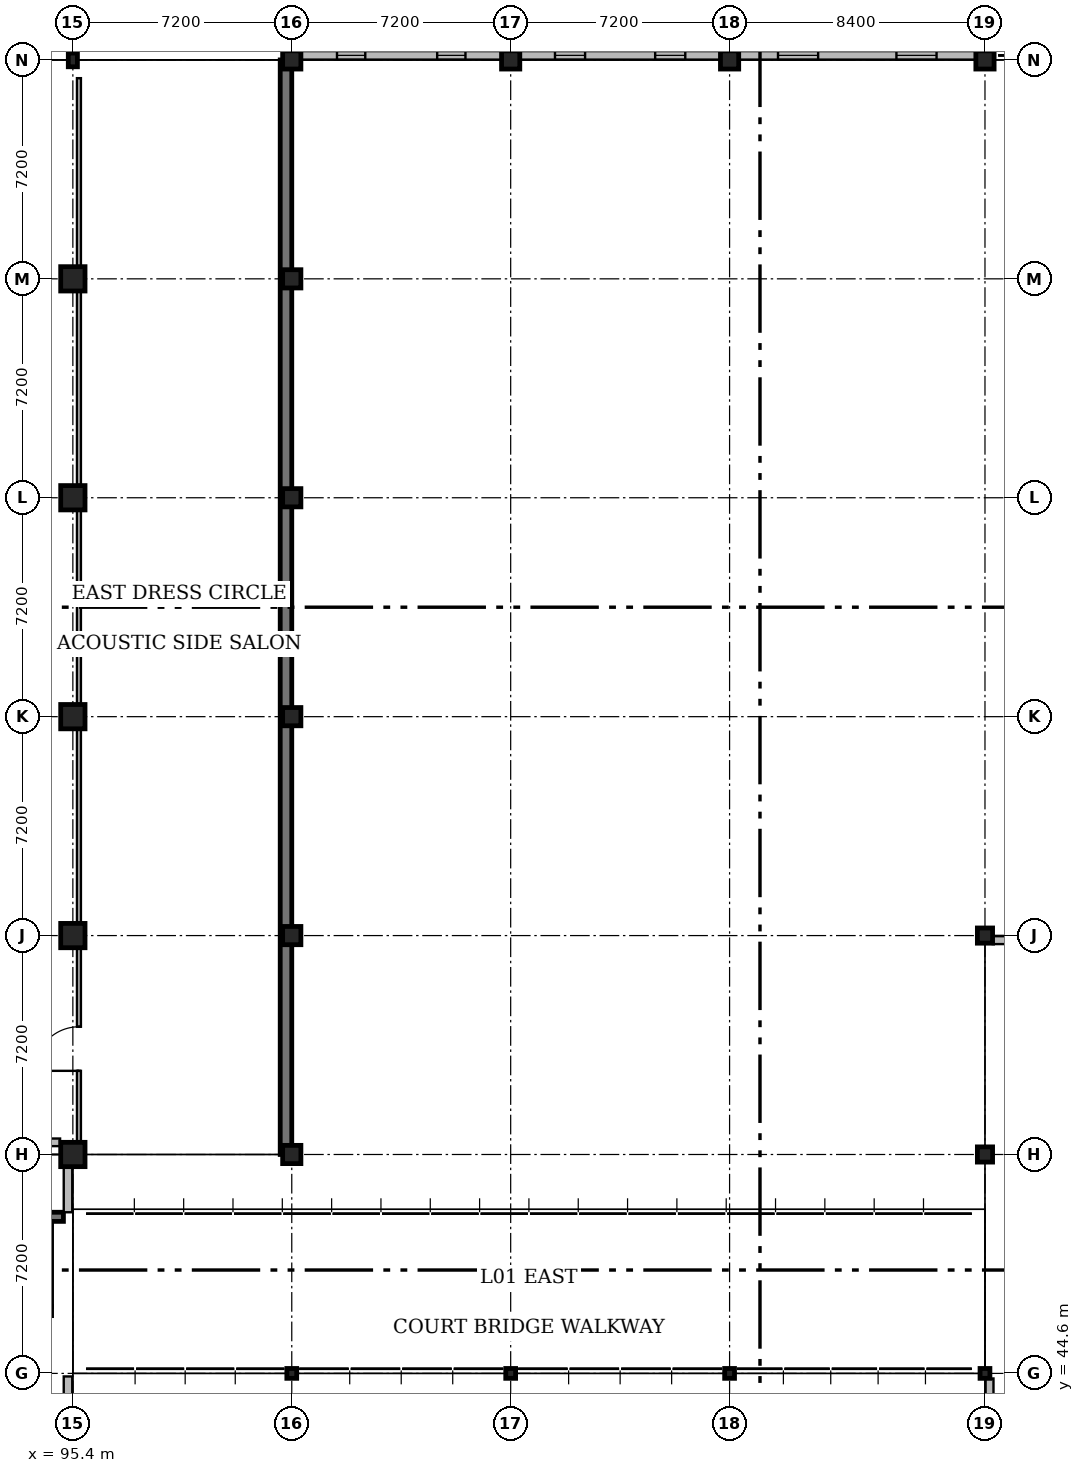
"""IFC4 building model, lengths in metres.
Left out: names, types, materials, properties, quantities, classifications, styles, units other than length and angle.
Written with IfcOpenShell. Run it as: python <this file> out.ifc"""

import sys

from ifc_helpers import new_model, si_unit, direction, frame, frame_2d, origin, origin_2d, place, context, subcontext, project, spatial, rectangle, hollow_circle, i_section, extrude, element, fill, save


model = new_model("IFC4")
c1 = context("Model", 3, precision=1e-05, world=origin(), true_north=direction((0.0, 1.0)))
c2 = subcontext(c1, "Body", "Model", "MODEL_VIEW")
j1 = project(units=[si_unit("LENGTHUNIT", "METRE"), si_unit("PLANEANGLEUNIT", "RADIAN")], contexts=[c1])
p1 = place(None, origin())
s1 = spatial("IfcSite", under=j1, at=p1, CompositionType="ELEMENT")
p2 = place(p1, origin())
s2 = spatial("IfcBuilding", under=s1, at=p2, CompositionType="ELEMENT")
p3 = place(p2, frame((0.0, 0.0, 4.8)))
s3 = spatial("IfcBuildingStorey", under=s2, at=p3, CompositionType="ELEMENT", Elevation=4.8)
for number, where, z_axis, x_axis in (
    (1, (95.4, 51.8, 0.0), (0.0, 0.0, 1.0), (1.0, 0.0, 0.0)),
    (2, (95.4, 59.0, 0.0), (0.0, 0.0, 1.0), (1.0, 0.0, 0.0)),
    (3, (95.4, 66.2, 0.0), (0.0, 0.0, 1.0), (1.0, 0.0, 0.0)),
    (4, (95.4, 73.4, 0.0), (0.0, 0.0, 1.0), (1.0, 0.0, 0.0)),
    (5, (95.4, 80.6, 0.0), (0.0, 0.0, 1.0), (1.0, 0.0, 0.0)),
):
    element("IfcColumn", number, at=place(p3, frame(where, z_axis=z_axis, x_axis=x_axis)), inside=s3, PredefinedType="COLUMN", context=c2, shape_type="SweptSolid", body=[
        extrude(rectangle(XDim=0.8, YDim=0.8, at=origin_2d()), origin(), (0.0, 0.0, 1.0), 4.2),
    ])
p4 = place(p3, frame((95.4, 87.8, 0.0), z_axis=(0.0, 0.0, 1.0), x_axis=(1.0, 0.0, 0.0)))
e6 = element("IfcColumn", 6, at=p4, inside=s3, PredefinedType="COLUMN", context=c2, shape_type="SweptSolid", body=[
    extrude(i_section(OverallWidth=0.3, OverallDepth=0.45, WebThickness=0.014, FlangeThickness=0.026, FilletRadius=0.027, at=origin_2d()), origin(), (0.0, 0.0, 1.0), 4.2),
])
p5 = place(p3, frame((102.6, 44.6, 0.0), z_axis=(0.0, 0.0, 1.0), x_axis=(1.0, 0.0, 0.0)))
e7 = element("IfcColumn", 7, at=p5, inside=s3, PredefinedType="COLUMN", context=c2, shape_type="SweptSolid", body=[
    extrude(hollow_circle(Radius=0.162, WallThickness=0.012, at=origin_2d()), origin(), (0.0, 0.0, 1.0), 4.2),
])
for number, where, z_axis, x_axis in (
    (8, (102.6, 51.8, 0.0), (0.0, 0.0, 1.0), (1.0, 0.0, 0.0)),
    (9, (102.6, 59.0, 0.0), (0.0, 0.0, 1.0), (1.0, 0.0, 0.0)),
    (10, (102.6, 66.2, 0.0), (0.0, 0.0, 1.0), (1.0, 0.0, 0.0)),
    (11, (102.6, 73.4, 0.0), (0.0, 0.0, 1.0), (1.0, 0.0, 0.0)),
    (12, (102.6, 80.6, 0.0), (0.0, 0.0, 1.0), (1.0, 0.0, 0.0)),
    (13, (102.6, 87.8, 0.0), (0.0, 0.0, 1.0), (1.0, 0.0, 0.0)),
):
    element("IfcColumn", number, at=place(p3, frame(where, z_axis=z_axis, x_axis=x_axis)), inside=s3, PredefinedType="COLUMN", context=c2, shape_type="SweptSolid", body=[
        extrude(rectangle(XDim=0.6, YDim=0.6, at=origin_2d()), origin(), (0.0, 0.0, 1.0), 4.2),
    ])
p6 = place(p3, frame((109.8, 44.6, 0.0), z_axis=(0.0, 0.0, 1.0), x_axis=(1.0, 0.0, 0.0)))
e14 = element("IfcColumn", 14, at=p6, inside=s3, PredefinedType="COLUMN", context=c2, shape_type="SweptSolid", body=[
    extrude(hollow_circle(Radius=0.162, WallThickness=0.012, at=origin_2d()), origin(), (0.0, 0.0, 1.0), 4.2),
])
p7 = place(p3, frame((109.8, 87.8, 0.0), z_axis=(0.0, 0.0, 1.0), x_axis=(1.0, 0.0, 0.0)))
e15 = element("IfcColumn", 15, at=p7, inside=s3, PredefinedType="COLUMN", context=c2, shape_type="SweptSolid", body=[
    extrude(rectangle(XDim=0.6, YDim=0.6, at=origin_2d()), origin(), (0.0, 0.0, 1.0), 4.2),
])
p8 = place(p3, frame((117.0, 44.6, 0.0), z_axis=(0.0, 0.0, 1.0), x_axis=(1.0, 0.0, 0.0)))
e16 = element("IfcColumn", 16, at=p8, inside=s3, PredefinedType="COLUMN", context=c2, shape_type="SweptSolid", body=[
    extrude(hollow_circle(Radius=0.162, WallThickness=0.012, at=origin_2d()), origin(), (0.0, 0.0, 1.0), 4.2),
])
p9 = place(p3, frame((117.0, 87.8, 0.0), z_axis=(0.0, 0.0, 1.0), x_axis=(1.0, 0.0, 0.0)))
e17 = element("IfcColumn", 17, at=p9, inside=s3, PredefinedType="COLUMN", context=c2, shape_type="SweptSolid", body=[
    extrude(rectangle(XDim=0.6, YDim=0.6, at=origin_2d()), origin(), (0.0, 0.0, 1.0), 4.2),
])
p10 = place(p3, frame((125.4, 44.6, 0.0), z_axis=(0.0, 0.0, 1.0), x_axis=(1.0, 0.0, 0.0)))
e18 = element("IfcColumn", 18, at=p10, inside=s3, PredefinedType="COLUMN", context=c2, shape_type="SweptSolid", body=[
    extrude(hollow_circle(Radius=0.162, WallThickness=0.012, at=origin_2d()), origin(), (0.0, 0.0, 1.0), 4.2),
])
for number, where, z_axis, x_axis in (
    (19, (125.4, 51.8, 0.0), (0.0, 0.0, 1.0), (1.0, 0.0, 0.0)),
    (20, (125.4, 59.0, 0.0), (0.0, 0.0, 1.0), (1.0, 0.0, 0.0)),
):
    element("IfcColumn", number, at=place(p3, frame(where, z_axis=z_axis, x_axis=x_axis)), inside=s3, PredefinedType="COLUMN", context=c2, shape_type="SweptSolid", body=[
        extrude(rectangle(XDim=0.5, YDim=0.5, at=origin_2d()), origin(), (0.0, 0.0, 1.0), 4.2),
    ])
p11 = place(p3, frame((125.4, 87.8, 0.0), z_axis=(0.0, 0.0, 1.0), x_axis=(1.0, 0.0, 0.0)))
e21 = element("IfcColumn", 21, at=p11, inside=s3, PredefinedType="COLUMN", context=c2, shape_type="SweptSolid", body=[
    extrude(rectangle(XDim=0.6, YDim=0.6, at=origin_2d()), origin(), (0.0, 0.0, 1.0), 4.2),
])
p12 = place(p3, frame((91.9, 49.75, 0.0), z_axis=(0.0, 0.0, 1.0), x_axis=(1.0, 0.0, 0.0)))
e22 = element("IfcWall", 22, at=p12, inside=s3, PredefinedType="SOLIDWALL", context=c2, shape_type="SweptSolid", body=[
    extrude(rectangle(XDim=3.19, YDim=0.3, at=frame_2d((1.595, 0.0))), origin(), (0.0, 0.0, 1.0), 4.2),
])
p13 = place(p3, frame((95.24, 37.78, 0.0), z_axis=(0.0, 0.0, 1.0), x_axis=(0.0, 1.0, 0.0)))
e23 = element("IfcWall", 23, at=p13, inside=s3, PredefinedType="SOLIDWALL", context=c2, shape_type="SweptSolid", body=[
    extrude(rectangle(XDim=6.72, YDim=0.28, at=frame_2d((3.36, 0.0))), origin(), (0.0, 0.0, 1.0), 3.373),
])
p14 = place(p13, frame((0.87, 0.0, 0.95)))
e24 = element("IfcOpeningElement", 24, at=p14, cuts=e23, PredefinedType="OPENING", context=c2, shape_type="SweptSolid", body=[
    extrude(rectangle(XDim=1.62, YDim=1.75, at=frame_2d((0.81, 0.875))), frame((0.0, 0.16, 0.0), z_axis=(0.0, -1.0, 0.0), x_axis=(1.0, 0.0, 0.0)), (0.0, 0.0, 1.0), 0.32),
])
p15 = place(p13, frame((4.23, 0.0, 0.95)))
e25 = element("IfcOpeningElement", 25, at=p15, cuts=e23, PredefinedType="OPENING", context=c2, shape_type="SweptSolid", body=[
    extrude(rectangle(XDim=1.62, YDim=1.75, at=frame_2d((0.81, 0.875))), frame((0.0, 0.16, 0.0), z_axis=(0.0, -1.0, 0.0), x_axis=(1.0, 0.0, 0.0)), (0.0, 0.0, 1.0), 0.32),
])
p16 = place(p3, frame((95.24, 49.9, 0.0), z_axis=(0.0, 0.0, 1.0), x_axis=(0.0, 1.0, 0.0)))
e26 = element("IfcWall", 26, at=p16, inside=s3, PredefinedType="SOLIDWALL", context=c2, shape_type="SweptSolid", body=[
    extrude(rectangle(XDim=1.95, YDim=0.28, at=frame_2d((0.975, 0.0))), origin(), (0.0, 0.0, 1.0), 3.373),
])
p17 = place(p3, frame((125.655, 58.85, 0.0), z_axis=(0.0, 0.0, 1.0), x_axis=(1.0, 0.0, 0.0)))
e27 = element("IfcWall", 27, at=p17, inside=s3, PredefinedType="SOLIDWALL", context=c2, shape_type="SweptSolid", body=[
    extrude(rectangle(XDim=7.89, YDim=0.26, at=frame_2d((3.945, 0.0))), origin(), (0.0, 0.0, 1.0), 3.273),
])
p18 = place(p17, frame((1.508, 0.0, 0.95)))
e28 = element("IfcOpeningElement", 28, at=p18, cuts=e27, PredefinedType="OPENING", context=c2, shape_type="SweptSolid", body=[
    extrude(rectangle(XDim=0.93, YDim=1.55, at=frame_2d((0.465, 0.775))), frame((0.0, 0.15, 0.0), z_axis=(0.0, -1.0, 0.0), x_axis=(1.0, 0.0, 0.0)), (0.0, 0.0, 1.0), 0.3),
])
p19 = place(p17, frame((5.452, 0.0, 0.95)))
e29 = element("IfcOpeningElement", 29, at=p19, cuts=e27, PredefinedType="OPENING", context=c2, shape_type="SweptSolid", body=[
    extrude(rectangle(XDim=0.93, YDim=1.55, at=frame_2d((0.465, 0.775))), frame((0.0, 0.15, 0.0), z_axis=(0.0, -1.0, 0.0), x_axis=(1.0, 0.0, 0.0)), (0.0, 0.0, 1.0), 0.3),
])
p20 = place(p3, frame((125.55, 37.655, 0.0), z_axis=(0.0, 0.0, 1.0), x_axis=(0.0, 1.0, 0.0)))
e30 = element("IfcWall", 30, at=p20, inside=s3, PredefinedType="SOLIDWALL", context=c2, shape_type="SweptSolid", body=[
    extrude(rectangle(XDim=6.778, YDim=0.26, at=frame_2d((3.389, 0.0))), origin(), (0.0, 0.0, 1.0), 3.653),
])
p21 = place(p20, frame((0.969, 0.0, 0.95)))
e31 = element("IfcOpeningElement", 31, at=p21, cuts=e30, PredefinedType="OPENING", context=c2, shape_type="SweptSolid", body=[
    extrude(rectangle(XDim=1.45, YDim=1.85, at=frame_2d((0.725, 0.925))), frame((0.0, 0.15, 0.0), z_axis=(0.0, -1.0, 0.0), x_axis=(1.0, 0.0, 0.0)), (0.0, 0.0, 1.0), 0.3),
])
p22 = place(p20, frame((4.359, 0.0, 0.95)))
e32 = element("IfcOpeningElement", 32, at=p22, cuts=e30, PredefinedType="OPENING", context=c2, shape_type="SweptSolid", body=[
    extrude(rectangle(XDim=1.45, YDim=1.85, at=frame_2d((0.725, 0.925))), frame((0.0, 0.15, 0.0), z_axis=(0.0, -1.0, 0.0), x_axis=(1.0, 0.0, 0.0)), (0.0, 0.0, 1.0), 0.3),
])
p23 = place(p3, frame((102.41, 87.8, 0.0), z_axis=(0.0, 0.0, 1.0), x_axis=(0.0, -1.0, 0.0)))
e33 = element("IfcWall", 33, at=p23, inside=s3, PredefinedType="SOLIDWALL", context=c2, shape_type="SweptSolid", body=[
    extrude(rectangle(XDim=36.0, YDim=0.38, at=frame_2d((18.0, 0.0))), origin(), (0.0, 0.0, 1.0), 3.94),
])
p24 = place(p3, frame((102.905, 87.95, 0.0), z_axis=(0.0, 0.0, 1.0), x_axis=(1.0, 0.0, 0.0)))
e34 = element("IfcWall", 34, at=p24, inside=s3, PredefinedType="SOLIDWALL", context=c2, shape_type="SweptSolid", body=[
    extrude(rectangle(XDim=6.59, YDim=0.28, at=frame_2d((3.295, 0.0))), origin(), (0.0, 0.0, 1.0), 3.273),
])
p25 = place(p24, frame((1.183, 0.0, 0.95)))
e35 = element("IfcOpeningElement", 35, at=p25, cuts=e34, PredefinedType="OPENING", context=c2, shape_type="SweptSolid", body=[
    extrude(rectangle(XDim=0.93, YDim=1.8, at=frame_2d((0.465, 0.9))), frame((0.0, 0.16, 0.0), z_axis=(0.0, -1.0, 0.0), x_axis=(1.0, 0.0, 0.0)), (0.0, 0.0, 1.0), 0.32),
])
p26 = place(p24, frame((4.478, 0.0, 0.95)))
e36 = element("IfcOpeningElement", 36, at=p26, cuts=e34, PredefinedType="OPENING", context=c2, shape_type="SweptSolid", body=[
    extrude(rectangle(XDim=0.93, YDim=1.8, at=frame_2d((0.465, 0.9))), frame((0.0, 0.16, 0.0), z_axis=(0.0, -1.0, 0.0), x_axis=(1.0, 0.0, 0.0)), (0.0, 0.0, 1.0), 0.32),
])
p27 = place(p3, frame((110.105, 87.95, 0.0), z_axis=(0.0, 0.0, 1.0), x_axis=(1.0, 0.0, 0.0)))
e37 = element("IfcWall", 37, at=p27, inside=s3, PredefinedType="SOLIDWALL", context=c2, shape_type="SweptSolid", body=[
    extrude(rectangle(XDim=6.59, YDim=0.28, at=frame_2d((3.295, 0.0))), origin(), (0.0, 0.0, 1.0), 3.273),
])
p28 = place(p27, frame((1.153, 0.0, 0.95)))
e38 = element("IfcOpeningElement", 38, at=p28, cuts=e37, PredefinedType="OPENING", context=c2, shape_type="SweptSolid", body=[
    extrude(rectangle(XDim=0.99, YDim=1.8, at=frame_2d((0.495, 0.9))), frame((0.0, 0.16, 0.0), z_axis=(0.0, -1.0, 0.0), x_axis=(1.0, 0.0, 0.0)), (0.0, 0.0, 1.0), 0.32),
])
p29 = place(p27, frame((4.448, 0.0, 0.95)))
e39 = element("IfcOpeningElement", 39, at=p29, cuts=e37, PredefinedType="OPENING", context=c2, shape_type="SweptSolid", body=[
    extrude(rectangle(XDim=0.99, YDim=1.8, at=frame_2d((0.495, 0.9))), frame((0.0, 0.16, 0.0), z_axis=(0.0, -1.0, 0.0), x_axis=(1.0, 0.0, 0.0)), (0.0, 0.0, 1.0), 0.32),
])
p30 = place(p3, frame((117.305, 87.95, 0.0), z_axis=(0.0, 0.0, 1.0), x_axis=(1.0, 0.0, 0.0)))
e40 = element("IfcWall", 40, at=p30, inside=s3, PredefinedType="SOLIDWALL", context=c2, shape_type="SweptSolid", body=[
    extrude(rectangle(XDim=7.79, YDim=0.28, at=frame_2d((3.895, 0.0))), origin(), (0.0, 0.0, 1.0), 3.273),
])
p31 = place(p30, frame((1.288, 0.0, 0.95)))
e41 = element("IfcOpeningElement", 41, at=p31, cuts=e40, PredefinedType="OPENING", context=c2, shape_type="SweptSolid", body=[
    extrude(rectangle(XDim=1.32, YDim=1.65, at=frame_2d((0.66, 0.825))), frame((0.0, 0.16, 0.0), z_axis=(0.0, -1.0, 0.0), x_axis=(1.0, 0.0, 0.0)), (0.0, 0.0, 1.0), 0.32),
])
p32 = place(p30, frame((5.183, 0.0, 0.95)))
e42 = element("IfcOpeningElement", 42, at=p32, cuts=e40, PredefinedType="OPENING", context=c2, shape_type="SweptSolid", body=[
    extrude(rectangle(XDim=1.32, YDim=1.65, at=frame_2d((0.66, 0.825))), frame((0.0, 0.16, 0.0), z_axis=(0.0, -1.0, 0.0), x_axis=(1.0, 0.0, 0.0)), (0.0, 0.0, 1.0), 0.32),
])
p33 = place(p3, frame((94.98, 52.2, 0.0), z_axis=(0.0, 0.0, 1.0), x_axis=(-1.0, 0.0, 0.0)))
e43 = element("IfcWall", 43, at=p33, inside=s3, PredefinedType="PARTITIONING", context=c2, shape_type="SweptSolid", body=[
    extrude(rectangle(XDim=4.56, YDim=0.25, at=frame_2d((2.28, 0.0))), origin(), (0.0, 0.0, 1.0), 3.26),
])
p34 = place(p33, frame((1.48, 0.0, 0.0)))
e44 = element("IfcOpeningElement", 44, at=p34, cuts=e43, PredefinedType="OPENING", context=c2, shape_type="SweptSolid", body=[
    extrude(rectangle(XDim=1.6, YDim=2.25, at=frame_2d((0.8, 1.125))), frame((0.0, 0.145, 0.0), z_axis=(0.0, -1.0, 0.0), x_axis=(1.0, 0.0, 0.0)), (0.0, 0.0, 1.0), 0.29),
])
p35 = place(p3, frame((95.6, 52.22, 0.0), z_axis=(0.0, 0.0, 1.0), x_axis=(0.0, 1.0, 0.0)))
e45 = element("IfcWall", 45, at=p35, inside=s3, PredefinedType="PARTITIONING", context=c2, shape_type="SweptSolid", body=[
    extrude(rectangle(XDim=6.36, YDim=0.13, at=frame_2d((3.18, 0.0))), origin(), (0.0, 0.0, 1.0), 3.55),
])
p36 = place(p35, frame((2.331, 0.0, 0.0)))
e46 = element("IfcOpeningElement", 46, at=p36, cuts=e45, PredefinedType="OPENING", context=c2, shape_type="SweptSolid", body=[
    extrude(rectangle(XDim=1.45, YDim=2.2, at=frame_2d((0.725, 1.1))), frame((0.0, 0.085, 0.0), z_axis=(0.0, -1.0, 0.0), x_axis=(1.0, 0.0, 0.0)), (0.0, 0.0, 1.0), 0.17),
])
p37 = place(p3, frame((95.6, 59.42, 0.0), z_axis=(0.0, 0.0, 1.0), x_axis=(0.0, 1.0, 0.0)))
e47 = element("IfcWall", 47, at=p37, inside=s3, PredefinedType="PARTITIONING", context=c2, shape_type="SweptSolid", body=[
    extrude(rectangle(XDim=6.36, YDim=0.13, at=frame_2d((3.18, 0.0))), origin(), (0.0, 0.0, 1.0), 3.55),
])
for number, where, z_axis, x_axis in (
    (48, (95.6, 66.62, 0.0), (0.0, 0.0, 1.0), (0.0, 1.0, 0.0)),
    (49, (95.6, 73.82, 0.0), (0.0, 0.0, 1.0), (0.0, 1.0, 0.0)),
):
    element("IfcWall", number, at=place(p3, frame(where, z_axis=z_axis, x_axis=x_axis)), inside=s3, PredefinedType="PARTITIONING", context=c2, shape_type="SweptSolid", body=[
        extrude(rectangle(XDim=6.36, YDim=0.13, at=frame_2d((3.18, 0.0))), origin(), (0.0, 0.0, 1.0), 3.55),
    ])
p38 = place(p3, frame((95.6, 81.02, 0.0), z_axis=(0.0, 0.0, 1.0), x_axis=(0.0, 1.0, 0.0)))
e50 = element("IfcWall", 50, at=p38, inside=s3, PredefinedType="PARTITIONING", context=c2, shape_type="SweptSolid", body=[
    extrude(rectangle(XDim=6.18, YDim=0.13, at=frame_2d((3.09, 0.0))), origin(), (0.0, 0.0, 1.0), 3.55),
])
p39 = place(p25, origin())
e51 = element("IfcWindow", 51, at=p39, inside=s3, PartitioningType="SINGLE_PANEL", PredefinedType="WINDOW", context=c2, shape_type="SweptSolid", body=[
    extrude(rectangle(XDim=0.93, YDim=1.8, at=frame_2d((0.465, 0.9))), frame((0.0, 0.03, 0.0), z_axis=(0.0, -1.0, 0.0), x_axis=(1.0, 0.0, 0.0)), (0.0, 0.0, 1.0), 0.06),
])
fill(e35, e51)
p40 = place(p26, origin())
e52 = element("IfcWindow", 52, at=p40, inside=s3, PartitioningType="SINGLE_PANEL", PredefinedType="WINDOW", context=c2, shape_type="SweptSolid", body=[
    extrude(rectangle(XDim=0.93, YDim=1.8, at=frame_2d((0.465, 0.9))), frame((0.0, 0.03, 0.0), z_axis=(0.0, -1.0, 0.0), x_axis=(1.0, 0.0, 0.0)), (0.0, 0.0, 1.0), 0.06),
])
fill(e36, e52)
p41 = place(p28, origin())
e53 = element("IfcWindow", 53, at=p41, inside=s3, PartitioningType="SINGLE_PANEL", PredefinedType="WINDOW", context=c2, shape_type="SweptSolid", body=[
    extrude(rectangle(XDim=0.99, YDim=1.8, at=frame_2d((0.495, 0.9))), frame((0.0, 0.03, 0.0), z_axis=(0.0, -1.0, 0.0), x_axis=(1.0, 0.0, 0.0)), (0.0, 0.0, 1.0), 0.06),
])
fill(e38, e53)
p42 = place(p29, origin())
e54 = element("IfcWindow", 54, at=p42, inside=s3, PartitioningType="SINGLE_PANEL", PredefinedType="WINDOW", context=c2, shape_type="SweptSolid", body=[
    extrude(rectangle(XDim=0.99, YDim=1.8, at=frame_2d((0.495, 0.9))), frame((0.0, 0.03, 0.0), z_axis=(0.0, -1.0, 0.0), x_axis=(1.0, 0.0, 0.0)), (0.0, 0.0, 1.0), 0.06),
])
fill(e39, e54)
p43 = place(p31, origin())
e55 = element("IfcWindow", 55, at=p43, inside=s3, PartitioningType="SINGLE_PANEL", PredefinedType="WINDOW", context=c2, shape_type="SweptSolid", body=[
    extrude(rectangle(XDim=1.32, YDim=1.65, at=frame_2d((0.66, 0.825))), frame((0.0, 0.03, 0.0), z_axis=(0.0, -1.0, 0.0), x_axis=(1.0, 0.0, 0.0)), (0.0, 0.0, 1.0), 0.06),
])
fill(e41, e55)
p44 = place(p32, origin())
e56 = element("IfcWindow", 56, at=p44, inside=s3, PartitioningType="SINGLE_PANEL", PredefinedType="WINDOW", context=c2, shape_type="SweptSolid", body=[
    extrude(rectangle(XDim=1.32, YDim=1.65, at=frame_2d((0.66, 0.825))), frame((0.0, 0.03, 0.0), z_axis=(0.0, -1.0, 0.0), x_axis=(1.0, 0.0, 0.0)), (0.0, 0.0, 1.0), 0.06),
])
fill(e42, e56)
p45 = place(p36, origin())
e57 = element("IfcDoor", 57, at=p45, inside=s3, OperationType="DOUBLE_DOOR_SINGLE_SWING", PredefinedType="DOOR", context=c2, shape_type="SweptSolid", body=[
    extrude(rectangle(XDim=1.45, YDim=2.2, at=frame_2d((0.725, 1.1))), frame((0.0, 0.025, 0.0), z_axis=(0.0, -1.0, 0.0), x_axis=(1.0, 0.0, 0.0)), (0.0, 0.0, 1.0), 0.05),
])
fill(e46, e57)
save(model, sys.argv[1])
